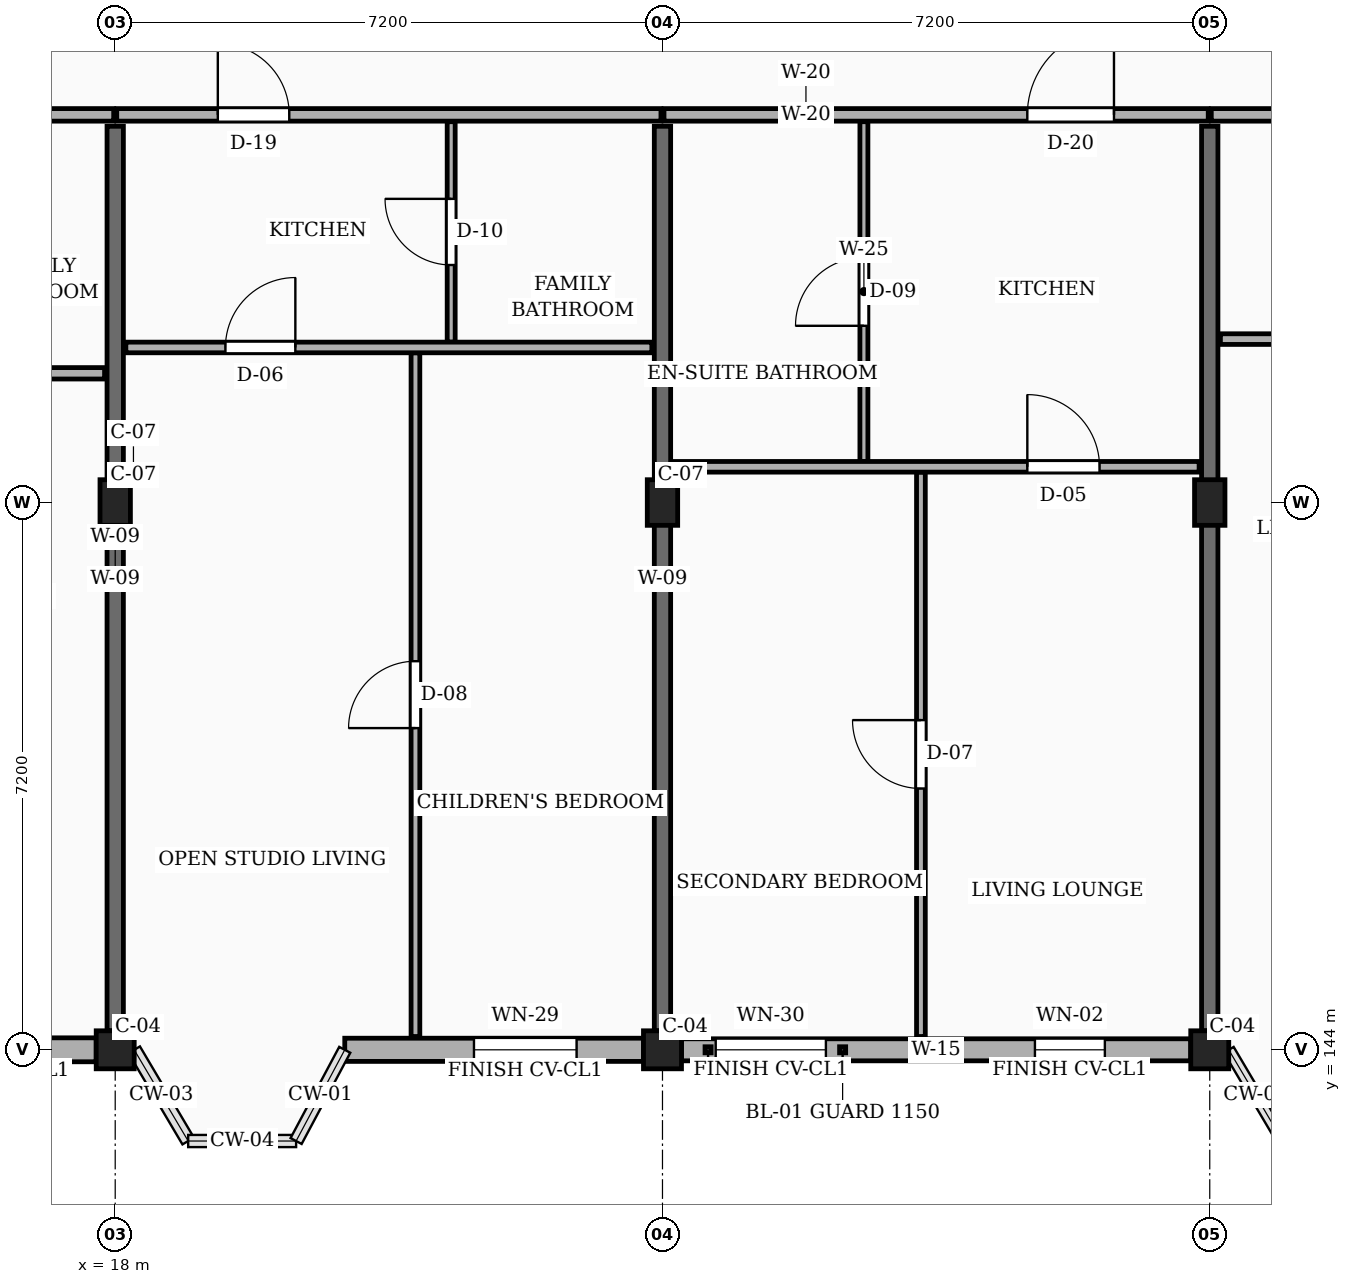
"""IFC4 building model, lengths in metres.
Left out: names, types, materials, properties, quantities, classifications, styles, units other than length and angle.
Written with IfcOpenShell. Run it as: python <this file> out.ifc"""

import sys

from ifc_helpers import new_model, si_unit, direction, frame, frame_2d, origin, origin_2d, place, context, subcontext, project, spatial, rectangle, extrude, element, fill, save


model = new_model("IFC4")
c1 = context("Model", 3, precision=1e-05, world=origin(), true_north=direction((0.0, 1.0)))
c2 = subcontext(c1, "Body", "Model", "MODEL_VIEW")
j1 = project(units=[si_unit("LENGTHUNIT", "METRE"), si_unit("PLANEANGLEUNIT", "RADIAN")], contexts=[c1])
p1 = place(None, origin())
s1 = spatial("IfcSite", under=j1, at=p1, CompositionType="ELEMENT")
p2 = place(p1, origin())
s2 = spatial("IfcBuilding", under=s1, at=p2, CompositionType="ELEMENT")
p3 = place(p2, frame((0.0, 0.0, 26.55)))
s3 = spatial("IfcBuildingStorey", under=s2, at=p3, CompositionType="ELEMENT", Elevation=26.55)
p4 = place(p3, frame((18.0, 144.0, 0.0), z_axis=(0.0, 0.0, 1.0), x_axis=(1.0, 0.0, 0.0)))
e1 = element("IfcColumn", 1, at=p4, inside=s3, PredefinedType="COLUMN", context=c2, shape_type="SweptSolid", body=[
    extrude(rectangle(XDim=0.5, YDim=0.5, at=origin_2d()), origin(), (0.0, 0.0, 1.0), 3.15),
])
p5 = place(p3, frame((18.0, 151.2, 0.0), z_axis=(0.0, 0.0, 1.0), x_axis=(1.0, 0.0, 0.0)))
e2 = element("IfcColumn", 2, at=p5, inside=s3, PredefinedType="COLUMN", context=c2, shape_type="SweptSolid", body=[
    extrude(rectangle(XDim=0.4, YDim=0.6, at=origin_2d()), origin(), (0.0, 0.0, 1.0), 3.15),
])
p6 = place(p3, frame((25.2, 144.0, 0.0), z_axis=(0.0, 0.0, 1.0), x_axis=(1.0, 0.0, 0.0)))
e3 = element("IfcColumn", 3, at=p6, inside=s3, PredefinedType="COLUMN", context=c2, shape_type="SweptSolid", body=[
    extrude(rectangle(XDim=0.5, YDim=0.5, at=origin_2d()), origin(), (0.0, 0.0, 1.0), 3.15),
])
p7 = place(p3, frame((25.2, 151.2, 0.0), z_axis=(0.0, 0.0, 1.0), x_axis=(1.0, 0.0, 0.0)))
e4 = element("IfcColumn", 4, at=p7, inside=s3, PredefinedType="COLUMN", context=c2, shape_type="SweptSolid", body=[
    extrude(rectangle(XDim=0.4, YDim=0.6, at=origin_2d()), origin(), (0.0, 0.0, 1.0), 3.15),
])
p8 = place(p3, frame((32.4, 144.0, 0.0), z_axis=(0.0, 0.0, 1.0), x_axis=(1.0, 0.0, 0.0)))
e5 = element("IfcColumn", 5, at=p8, inside=s3, PredefinedType="COLUMN", context=c2, shape_type="SweptSolid", body=[
    extrude(rectangle(XDim=0.5, YDim=0.5, at=origin_2d()), origin(), (0.0, 0.0, 1.0), 3.15),
])
p9 = place(p3, frame((32.4, 151.2, 0.0), z_axis=(0.0, 0.0, 1.0), x_axis=(1.0, 0.0, 0.0)))
e6 = element("IfcColumn", 6, at=p9, inside=s3, PredefinedType="COLUMN", context=c2, shape_type="SweptSolid", body=[
    extrude(rectangle(XDim=0.4, YDim=0.6, at=origin_2d()), origin(), (0.0, 0.0, 1.0), 3.15),
])
for number, where, z_axis, x_axis in (
    (7, (18.0, 144.25, 0.0), (0.0, 0.0, 1.0), (0.0, 1.0, 0.0)),
    (8, (25.2, 144.25, 0.0), (0.0, 0.0, 1.0), (0.0, 1.0, 0.0)),
    (9, (32.4, 144.25, 0.0), (0.0, 0.0, 1.0), (0.0, 1.0, 0.0)),
):
    element("IfcWall", number, at=place(p3, frame(where, z_axis=z_axis, x_axis=x_axis)), inside=s3, PredefinedType="SOLIDWALL", context=c2, shape_type="SweptSolid", body=[
        extrude(rectangle(XDim=11.9, YDim=0.215, at=frame_2d((5.95, 0.0))), origin(), (0.0, 0.0, 1.0), 2.185),
    ])
p10 = place(p3, frame((11.05, 144.0, 0.0), z_axis=(0.0, 0.0, 1.0), x_axis=(1.0, 0.0, 0.0)))
e10 = element("IfcWall", 10, at=p10, inside=s3, PredefinedType="SOLIDWALL", context=c2, shape_type="SweptSolid", body=[
    extrude(rectangle(XDim=6.7, YDim=0.315, at=frame_2d((3.35, 0.0))), origin(), (0.0, 0.0, 1.0), 2.455),
])
p11 = place(p10, frame((0.45, 0.0, 0.78)))
e11 = element("IfcOpeningElement", 11, at=p11, cuts=e10, PredefinedType="OPENING", context=c2, shape_type="SweptSolid", body=[
    extrude(rectangle(XDim=1.15, YDim=1.44, at=frame_2d((0.575, 0.72))), frame((0.0, 0.167, 0.0), z_axis=(0.0, -1.0, 0.0), x_axis=(1.0, 0.0, 0.0)), (0.0, 0.0, 1.0), 0.335),
])
p12 = place(p10, frame((4.65, 0.0, 0.78)))
e12 = element("IfcOpeningElement", 12, at=p12, cuts=e10, PredefinedType="OPENING", context=c2, shape_type="SweptSolid", body=[
    extrude(rectangle(XDim=1.35, YDim=1.44, at=frame_2d((0.675, 0.72))), frame((0.0, 0.167, 0.0), z_axis=(0.0, -1.0, 0.0), x_axis=(1.0, 0.0, 0.0)), (0.0, 0.0, 1.0), 0.335),
])
p13 = place(p3, frame((21.02, 144.0, 0.0), z_axis=(0.0, 0.0, 1.0), x_axis=(1.0, 0.0, 0.0)))
e13 = element("IfcWall", 13, at=p13, inside=s3, PredefinedType="SOLIDWALL", context=c2, shape_type="SweptSolid", body=[
    extrude(rectangle(XDim=3.93, YDim=0.305, at=frame_2d((1.965, 0.0))), origin(), (0.0, 0.0, 1.0), 2.455),
])
p14 = place(p13, frame((1.7, 0.0, 0.78)))
e14 = element("IfcOpeningElement", 14, at=p14, cuts=e13, PredefinedType="OPENING", context=c2, shape_type="SweptSolid", body=[
    extrude(rectangle(XDim=1.35, YDim=1.44, at=frame_2d((0.675, 0.72))), frame((0.0, 0.163, 0.0), z_axis=(0.0, -1.0, 0.0), x_axis=(1.0, 0.0, 0.0)), (0.0, 0.0, 1.0), 0.325),
])
p15 = place(p3, frame((25.45, 144.0, 0.0), z_axis=(0.0, 0.0, 1.0), x_axis=(1.0, 0.0, 0.0)))
e15 = element("IfcWall", 15, at=p15, inside=s3, PredefinedType="SOLIDWALL", context=c2, shape_type="SweptSolid", body=[
    extrude(rectangle(XDim=6.7, YDim=0.29, at=frame_2d((3.35, 0.0))), origin(), (0.0, 0.0, 1.0), 2.455),
])
p16 = place(p15, frame((0.45, 0.0, 0.78)))
e16 = element("IfcOpeningElement", 16, at=p16, cuts=e15, PredefinedType="OPENING", context=c2, shape_type="SweptSolid", body=[
    extrude(rectangle(XDim=1.45, YDim=1.44, at=frame_2d((0.725, 0.72))), frame((0.0, 0.155, 0.0), z_axis=(0.0, -1.0, 0.0), x_axis=(1.0, 0.0, 0.0)), (0.0, 0.0, 1.0), 0.31),
])
p17 = place(p15, frame((4.65, 0.0, 0.78)))
e17 = element("IfcOpeningElement", 17, at=p17, cuts=e15, PredefinedType="OPENING", context=c2, shape_type="SweptSolid", body=[
    extrude(rectangle(XDim=0.92, YDim=1.15, at=frame_2d((0.46, 0.575))), frame((0.0, 0.155, 0.0), z_axis=(0.0, -1.0, 0.0), x_axis=(1.0, 0.0, 0.0)), (0.0, 0.0, 1.0), 0.31),
])
p18 = place(p3, frame((10.975, 156.3, 0.0), z_axis=(0.0, 0.0, 1.0), x_axis=(1.0, 0.0, 0.0)))
e18 = element("IfcWall", 18, at=p18, inside=s3, PredefinedType="PARTITIONING", context=c2, shape_type="SweptSolid", body=[
    extrude(rectangle(XDim=7.005, YDim=0.165, at=frame_2d((3.502, 0.0))), origin(), (0.0, 0.0, 1.0), 2.32),
])
p19 = place(p18, frame((1.175, 0.0, 0.0)))
e19 = element("IfcOpeningElement", 19, at=p19, cuts=e18, PredefinedType="OPENING", context=c2, shape_type="SweptSolid", body=[
    extrude(rectangle(XDim=1.0, YDim=2.15, at=frame_2d((0.5, 1.075))), frame((0.0, 0.093, 0.0), z_axis=(0.0, -1.0, 0.0), x_axis=(1.0, 0.0, 0.0)), (0.0, 0.0, 1.0), 0.185),
])
p20 = place(p3, frame((18.02, 156.3, 0.0), z_axis=(0.0, 0.0, 1.0), x_axis=(1.0, 0.0, 0.0)))
e20 = element("IfcWall", 20, at=p20, inside=s3, PredefinedType="PARTITIONING", context=c2, shape_type="SweptSolid", body=[
    extrude(rectangle(XDim=7.16, YDim=0.165, at=frame_2d((3.58, 0.0))), origin(), (0.0, 0.0, 1.0), 2.32),
])
p21 = place(p20, frame((1.33, 0.0, 0.0)))
e21 = element("IfcOpeningElement", 21, at=p21, cuts=e20, PredefinedType="OPENING", context=c2, shape_type="SweptSolid", body=[
    extrude(rectangle(XDim=0.94, YDim=2.12, at=frame_2d((0.47, 1.06))), frame((0.0, 0.093, 0.0), z_axis=(0.0, -1.0, 0.0), x_axis=(1.0, 0.0, 0.0)), (0.0, 0.0, 1.0), 0.185),
])
p22 = place(p3, frame((25.22, 156.3, 0.0), z_axis=(0.0, 0.0, 1.0), x_axis=(1.0, 0.0, 0.0)))
e22 = element("IfcWall", 22, at=p22, inside=s3, PredefinedType="PARTITIONING", context=c2, shape_type="SweptSolid", body=[
    extrude(rectangle(XDim=7.16, YDim=0.165, at=frame_2d((3.58, 0.0))), origin(), (0.0, 0.0, 1.0), 2.32),
])
p23 = place(p22, frame((4.78, 0.0, 0.0)))
e23 = element("IfcOpeningElement", 23, at=p23, cuts=e22, PredefinedType="OPENING", context=c2, shape_type="SweptSolid", body=[
    extrude(rectangle(XDim=1.14, YDim=2.18, at=frame_2d((0.57, 1.09))), frame((0.0, 0.093, 0.0), z_axis=(0.0, -1.0, 0.0), x_axis=(1.0, 0.0, 0.0)), (0.0, 0.0, 1.0), 0.185),
])
p24 = place(p3, frame((32.42, 156.3, 0.0), z_axis=(0.0, 0.0, 1.0), x_axis=(1.0, 0.0, 0.0)))
e24 = element("IfcWall", 24, at=p24, inside=s3, PredefinedType="PARTITIONING", context=c2, shape_type="SweptSolid", body=[
    extrude(rectangle(XDim=7.16, YDim=0.165, at=frame_2d((3.58, 0.0))), origin(), (0.0, 0.0, 1.0), 2.32),
])
p25 = place(p24, frame((1.33, 0.0, 0.0)))
e25 = element("IfcOpeningElement", 25, at=p25, cuts=e24, PredefinedType="OPENING", context=c2, shape_type="SweptSolid", body=[
    extrude(rectangle(XDim=1.0, YDim=2.15, at=frame_2d((0.5, 1.075))), frame((0.0, 0.093, 0.0), z_axis=(0.0, -1.0, 0.0), x_axis=(1.0, 0.0, 0.0)), (0.0, 0.0, 1.0), 0.185),
])
p26 = place(p3, frame((10.975, 152.9, 0.0), z_axis=(0.0, 0.0, 1.0), x_axis=(1.0, 0.0, 0.0)))
e26 = element("IfcWall", 26, at=p26, inside=s3, PredefinedType="PARTITIONING", context=c2, shape_type="SweptSolid", body=[
    extrude(rectangle(XDim=6.885, YDim=0.15, at=frame_2d((3.442, 0.0))), origin(), (0.0, 0.0, 1.0), 2.32),
])
p27 = place(p26, frame((1.275, 0.0, 0.0)))
e27 = element("IfcOpeningElement", 27, at=p27, cuts=e26, PredefinedType="OPENING", context=c2, shape_type="SweptSolid", body=[
    extrude(rectangle(XDim=0.95, YDim=2.1, at=frame_2d((0.475, 1.05))), frame((0.0, 0.085, 0.0), z_axis=(0.0, -1.0, 0.0), x_axis=(1.0, 0.0, 0.0)), (0.0, 0.0, 1.0), 0.17),
])
p28 = place(p3, frame((21.95, 144.175, 0.0), z_axis=(0.0, 0.0, 1.0), x_axis=(0.0, 1.0, 0.0)))
e28 = element("IfcWall", 28, at=p28, inside=s3, PredefinedType="PARTITIONING", context=c2, shape_type="SweptSolid", body=[
    extrude(rectangle(XDim=8.995, YDim=0.115, at=frame_2d((4.498, 0.0))), origin(), (0.0, 0.0, 1.0), 2.32),
])
p29 = place(p28, frame((4.058, 0.0, 0.0)))
e29 = element("IfcOpeningElement", 29, at=p29, cuts=e28, PredefinedType="OPENING", context=c2, shape_type="SweptSolid", body=[
    extrude(rectangle(XDim=0.88, YDim=2.08, at=frame_2d((0.44, 1.04))), frame((0.0, 0.067, 0.0), z_axis=(0.0, -1.0, 0.0), x_axis=(1.0, 0.0, 0.0)), (0.0, 0.0, 1.0), 0.135),
])
p30 = place(p3, frame((22.42, 153.31, 0.0), z_axis=(0.0, 0.0, 1.0), x_axis=(0.0, 1.0, 0.0)))
e30 = element("IfcWall", 30, at=p30, inside=s3, PredefinedType="PARTITIONING", context=c2, shape_type="SweptSolid", body=[
    extrude(rectangle(XDim=2.9, YDim=0.105, at=frame_2d((1.45, 0.0))), origin(), (0.0, 0.0, 1.0), 2.32),
])
p31 = place(p30, frame((1.015, 0.0, 0.0)))
e31 = element("IfcOpeningElement", 31, at=p31, cuts=e30, PredefinedType="OPENING", context=c2, shape_type="SweptSolid", body=[
    extrude(rectangle(XDim=0.87, YDim=2.05, at=frame_2d((0.435, 1.025))), frame((0.0, 0.062, 0.0), z_axis=(0.0, -1.0, 0.0), x_axis=(1.0, 0.0, 0.0)), (0.0, 0.0, 1.0), 0.125),
])
p32 = place(p3, frame((18.14, 153.24, 0.0), z_axis=(0.0, 0.0, 1.0), x_axis=(1.0, 0.0, 0.0)))
e32 = element("IfcWall", 32, at=p32, inside=s3, PredefinedType="PARTITIONING", context=c2, shape_type="SweptSolid", body=[
    extrude(rectangle(XDim=6.92, YDim=0.14, at=frame_2d((3.46, 0.0))), origin(), (0.0, 0.0, 1.0), 2.32),
])
p33 = place(p32, frame((1.31, 0.0, 0.0)))
e33 = element("IfcOpeningElement", 33, at=p33, cuts=e32, PredefinedType="OPENING", context=c2, shape_type="SweptSolid", body=[
    extrude(rectangle(XDim=0.92, YDim=2.1, at=frame_2d((0.46, 1.05))), frame((0.0, 0.08, 0.0), z_axis=(0.0, -1.0, 0.0), x_axis=(1.0, 0.0, 0.0)), (0.0, 0.0, 1.0), 0.16),
])
p34 = place(p3, frame((28.6, 144.175, 0.0), z_axis=(0.0, 0.0, 1.0), x_axis=(0.0, 1.0, 0.0)))
e34 = element("IfcWall", 34, at=p34, inside=s3, PredefinedType="PARTITIONING", context=c2, shape_type="SweptSolid", body=[
    extrude(rectangle(XDim=7.425, YDim=0.115, at=frame_2d((3.712, 0.0))), origin(), (0.0, 0.0, 1.0), 2.32),
])
p35 = place(p34, frame((3.262, 0.0, 0.0)))
e35 = element("IfcOpeningElement", 35, at=p35, cuts=e34, PredefinedType="OPENING", context=c2, shape_type="SweptSolid", body=[
    extrude(rectangle(XDim=0.9, YDim=2.1, at=frame_2d((0.45, 1.05))), frame((0.0, 0.067, 0.0), z_axis=(0.0, -1.0, 0.0), x_axis=(1.0, 0.0, 0.0)), (0.0, 0.0, 1.0), 0.135),
])
p36 = place(p3, frame((27.85, 151.74, 0.0), z_axis=(0.0, 0.0, 1.0), x_axis=(0.0, 1.0, 0.0)))
e36 = element("IfcWall", 36, at=p36, inside=s3, PredefinedType="PARTITIONING", context=c2, shape_type="SweptSolid", body=[
    extrude(rectangle(XDim=4.47, YDim=0.105, at=frame_2d((2.235, 0.0))), origin(), (0.0, 0.0, 1.0), 2.32),
])
p37 = place(p36, frame((1.785, 0.0, 0.0)))
e37 = element("IfcOpeningElement", 37, at=p37, cuts=e36, PredefinedType="OPENING", context=c2, shape_type="SweptSolid", body=[
    extrude(rectangle(XDim=0.9, YDim=2.05, at=frame_2d((0.45, 1.025))), frame((0.0, 0.062, 0.0), z_axis=(0.0, -1.0, 0.0), x_axis=(1.0, 0.0, 0.0)), (0.0, 0.0, 1.0), 0.125),
])
p38 = place(p3, frame((25.34, 151.67, 0.0), z_axis=(0.0, 0.0, 1.0), x_axis=(1.0, 0.0, 0.0)))
e38 = element("IfcWall", 38, at=p38, inside=s3, PredefinedType="PARTITIONING", context=c2, shape_type="SweptSolid", body=[
    extrude(rectangle(XDim=6.92, YDim=0.14, at=frame_2d((3.46, 0.0))), origin(), (0.0, 0.0, 1.0), 2.32),
])
p39 = place(p38, frame((4.66, 0.0, 0.0)))
e39 = element("IfcOpeningElement", 39, at=p39, cuts=e38, PredefinedType="OPENING", context=c2, shape_type="SweptSolid", body=[
    extrude(rectangle(XDim=0.95, YDim=2.1, at=frame_2d((0.475, 1.05))), frame((0.0, 0.08, 0.0), z_axis=(0.0, -1.0, 0.0), x_axis=(1.0, 0.0, 0.0)), (0.0, 0.0, 1.0), 0.16),
])
p40 = place(p3, frame((32.54, 153.35, 0.0), z_axis=(0.0, 0.0, 1.0), x_axis=(1.0, 0.0, 0.0)))
e40 = element("IfcWall", 40, at=p40, inside=s3, PredefinedType="PARTITIONING", context=c2, shape_type="SweptSolid", body=[
    extrude(rectangle(XDim=6.92, YDim=0.14, at=frame_2d((3.46, 0.0))), origin(), (0.0, 0.0, 1.0), 2.32),
])
p41 = place(p40, frame((1.31, 0.0, 0.0)))
e41 = element("IfcOpeningElement", 41, at=p41, cuts=e40, PredefinedType="OPENING", context=c2, shape_type="SweptSolid", body=[
    extrude(rectangle(XDim=0.95, YDim=2.1, at=frame_2d((0.475, 1.05))), frame((0.0, 0.08, 0.0), z_axis=(0.0, -1.0, 0.0), x_axis=(1.0, 0.0, 0.0)), (0.0, 0.0, 1.0), 0.16),
])
p42 = place(p14, origin())
e42 = element("IfcWindow", 42, at=p42, inside=s3, PartitioningType="SINGLE_PANEL", PredefinedType="WINDOW", context=c2, shape_type="SweptSolid", body=[
    extrude(rectangle(XDim=1.35, YDim=1.44, at=frame_2d((0.675, 0.72))), frame((0.0, 0.03, 0.0), z_axis=(0.0, -1.0, 0.0), x_axis=(1.0, 0.0, 0.0)), (0.0, 0.0, 1.0), 0.06),
])
fill(e14, e42)
p43 = place(p16, origin())
e43 = element("IfcWindow", 43, at=p43, inside=s3, PartitioningType="SINGLE_PANEL", PredefinedType="WINDOW", context=c2, shape_type="SweptSolid", body=[
    extrude(rectangle(XDim=1.45, YDim=1.44, at=frame_2d((0.725, 0.72))), frame((0.0, 0.03, 0.0), z_axis=(0.0, -1.0, 0.0), x_axis=(1.0, 0.0, 0.0)), (0.0, 0.0, 1.0), 0.06),
])
fill(e16, e43)
p44 = place(p17, origin())
e44 = element("IfcWindow", 44, at=p44, inside=s3, PartitioningType="SINGLE_PANEL", PredefinedType="WINDOW", context=c2, shape_type="SweptSolid", body=[
    extrude(rectangle(XDim=0.92, YDim=1.15, at=frame_2d((0.46, 0.575))), frame((0.0, 0.03, 0.0), z_axis=(0.0, -1.0, 0.0), x_axis=(1.0, 0.0, 0.0)), (0.0, 0.0, 1.0), 0.06),
])
fill(e17, e44)
p45 = place(p21, origin())
e45 = element("IfcDoor", 45, at=p45, inside=s3, OperationType="SINGLE_SWING_LEFT", PredefinedType="DOOR", context=c2, shape_type="SweptSolid", body=[
    extrude(rectangle(XDim=0.94, YDim=2.12, at=frame_2d((0.47, 1.06))), frame((0.0, 0.025, 0.0), z_axis=(0.0, -1.0, 0.0), x_axis=(1.0, 0.0, 0.0)), (0.0, 0.0, 1.0), 0.05),
])
fill(e21, e45)
p46 = place(p23, origin())
e46 = element("IfcDoor", 46, at=p46, inside=s3, OperationType="SINGLE_SWING_RIGHT", PredefinedType="DOOR", context=c2, shape_type="SweptSolid", body=[
    extrude(rectangle(XDim=1.14, YDim=2.18, at=frame_2d((0.57, 1.09))), frame((0.0, 0.025, 0.0), z_axis=(0.0, -1.0, 0.0), x_axis=(1.0, 0.0, 0.0)), (0.0, 0.0, 1.0), 0.05),
])
fill(e23, e46)
p47 = place(p29, origin())
e47 = element("IfcDoor", 47, at=p47, inside=s3, OperationType="SINGLE_SWING_LEFT", PredefinedType="DOOR", context=c2, shape_type="SweptSolid", body=[
    extrude(rectangle(XDim=0.88, YDim=2.08, at=frame_2d((0.44, 1.04))), frame((0.0, 0.025, 0.0), z_axis=(0.0, -1.0, 0.0), x_axis=(1.0, 0.0, 0.0)), (0.0, 0.0, 1.0), 0.05),
])
fill(e29, e47)
p48 = place(p31, origin())
e48 = element("IfcDoor", 48, at=p48, inside=s3, OperationType="SINGLE_SWING_RIGHT", PredefinedType="DOOR", context=c2, shape_type="SweptSolid", body=[
    extrude(rectangle(XDim=0.87, YDim=2.05, at=frame_2d((0.435, 1.025))), frame((0.0, 0.025, 0.0), z_axis=(0.0, -1.0, 0.0), x_axis=(1.0, 0.0, 0.0)), (0.0, 0.0, 1.0), 0.05),
])
fill(e31, e48)
p49 = place(p33, origin())
e49 = element("IfcDoor", 49, at=p49, inside=s3, OperationType="SINGLE_SWING_RIGHT", PredefinedType="DOOR", context=c2, shape_type="SweptSolid", body=[
    extrude(rectangle(XDim=0.92, YDim=2.1, at=frame_2d((0.46, 1.05))), frame((0.0, 0.025, 0.0), z_axis=(0.0, -1.0, 0.0), x_axis=(1.0, 0.0, 0.0)), (0.0, 0.0, 1.0), 0.05),
])
fill(e33, e49)
p50 = place(p35, origin())
e50 = element("IfcDoor", 50, at=p50, inside=s3, OperationType="SINGLE_SWING_RIGHT", PredefinedType="DOOR", context=c2, shape_type="SweptSolid", body=[
    extrude(rectangle(XDim=0.9, YDim=2.1, at=frame_2d((0.45, 1.05))), frame((0.0, 0.025, 0.0), z_axis=(0.0, -1.0, 0.0), x_axis=(1.0, 0.0, 0.0)), (0.0, 0.0, 1.0), 0.05),
])
fill(e35, e50)
p51 = place(p37, origin())
e51 = element("IfcDoor", 51, at=p51, inside=s3, OperationType="SINGLE_SWING_LEFT", PredefinedType="DOOR", context=c2, shape_type="SweptSolid", body=[
    extrude(rectangle(XDim=0.9, YDim=2.05, at=frame_2d((0.45, 1.025))), frame((0.0, 0.025, 0.0), z_axis=(0.0, -1.0, 0.0), x_axis=(1.0, 0.0, 0.0)), (0.0, 0.0, 1.0), 0.05),
])
fill(e37, e51)
p52 = place(p39, origin())
e52 = element("IfcDoor", 52, at=p52, inside=s3, OperationType="SINGLE_SWING_LEFT", PredefinedType="DOOR", context=c2, shape_type="SweptSolid", body=[
    extrude(rectangle(XDim=0.95, YDim=2.1, at=frame_2d((0.475, 1.05))), frame((0.0, 0.025, 0.0), z_axis=(0.0, -1.0, 0.0), x_axis=(1.0, 0.0, 0.0)), (0.0, 0.0, 1.0), 0.05),
])
fill(e39, e52)
save(model, sys.argv[1])
